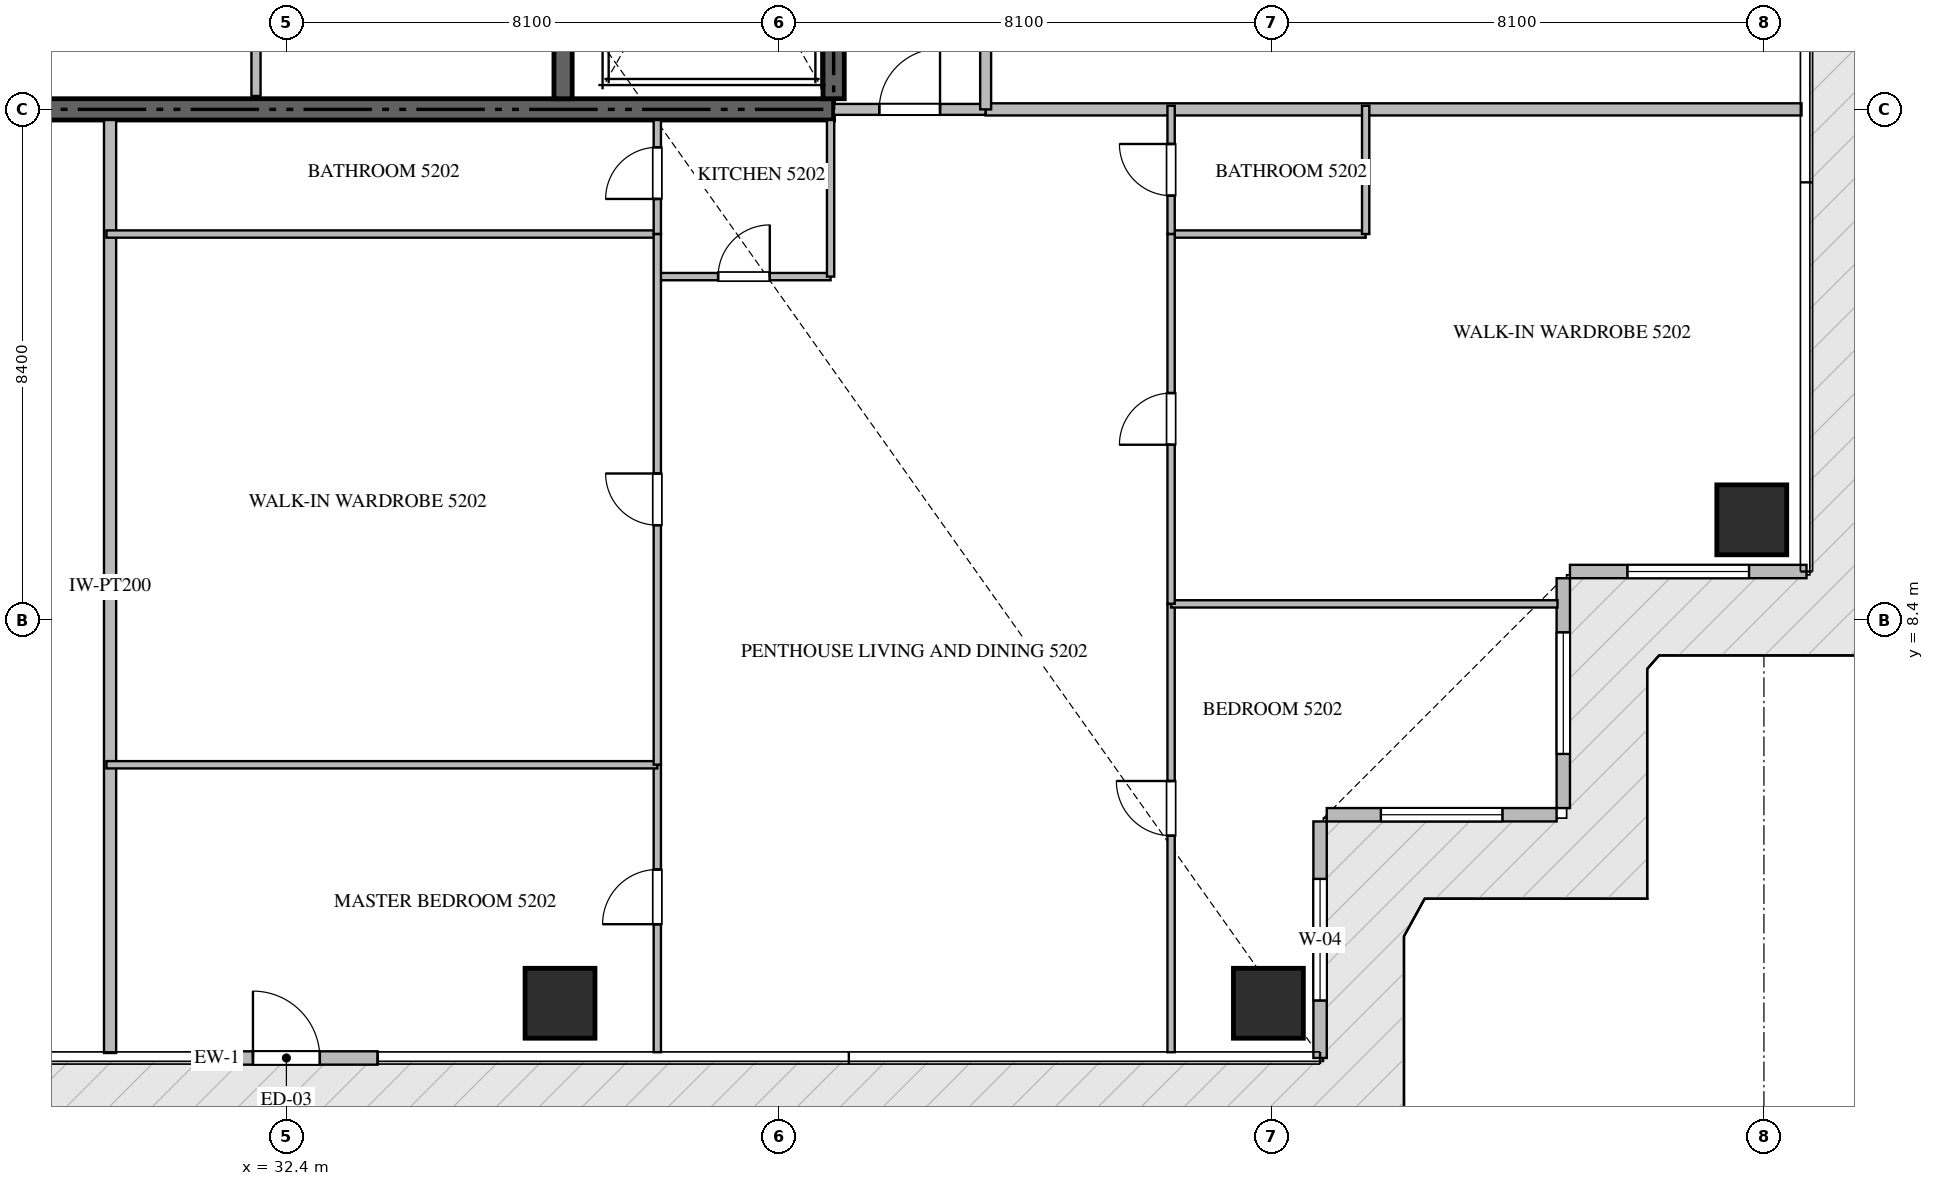
"""IFC4 building model, lengths in metres.
Left out: names, types, materials, properties, quantities, classifications, styles, units other than length and angle.
Written with IfcOpenShell. Run it as: python <this file> out.ifc"""

import sys

from ifc_helpers import new_model, si_unit, direction, frame, frame_2d, origin, origin_2d, place, context, subcontext, project, spatial, rectangle, extrude, source, transform, mapped, element, fill, save


model = new_model("IFC4")
c1 = context("Model", 3, precision=1e-05, world=origin(), true_north=direction((0.0, 1.0)))
c2 = subcontext(c1, "Body", "Model", "MODEL_VIEW")
j1 = project(units=[si_unit("LENGTHUNIT", "METRE"), si_unit("PLANEANGLEUNIT", "RADIAN")], contexts=[c1])
p1 = place(None, origin())
s1 = spatial("IfcSite", under=j1, at=p1, CompositionType="ELEMENT")
p2 = place(p1, origin())
s2 = spatial("IfcBuilding", under=s1, at=p2, CompositionType="ELEMENT")
p3 = place(p2, frame((0.0, 0.0, 210.45)))
s3 = spatial("IfcBuildingStorey", under=s2, at=p3, CompositionType="ELEMENT", Elevation=210.45)
p4 = place(p3, frame((23.4, 16.8, -0.44), z_axis=(0.0, 0.0, 1.0), x_axis=(1.0, 0.0, 0.0)))
e1 = element("IfcWall", 1, at=p4, inside=s3, PredefinedType="SHEAR", context=c2, shape_type="SweptSolid", body=[
    extrude(rectangle(XDim=18.0, YDim=0.35, at=frame_2d((9.0, 0.0))), origin(), (0.0, 0.0, 1.0), 4.028),
])
p5 = place(p3, frame((41.4, 16.975, -0.44), z_axis=(0.0, 0.0, 1.0), x_axis=(0.0, 1.0, 0.0)))
e2 = element("IfcWall", 2, at=p5, inside=s3, PredefinedType="SHEAR", context=c2, shape_type="SweptSolid", body=[
    extrude(rectangle(XDim=8.375, YDim=0.35, at=frame_2d((4.188, 0.0))), origin(), (0.0, 0.0, 1.0), 4.028),
])
p6 = place(p3, frame((36.95, 16.975, -0.44), z_axis=(0.0, 0.0, 1.0), x_axis=(0.0, 1.0, 0.0)))
e3 = element("IfcWall", 3, at=p6, inside=s3, PredefinedType="SHEAR", context=c2, shape_type="SweptSolid", body=[
    extrude(rectangle(XDim=8.375, YDim=0.3, at=frame_2d((4.188, 0.0))), origin(), (0.0, 0.0, 1.0), 4.028),
])
m1 = source(origin(), c2, "Body", "SweptSolid", [
    extrude(rectangle(XDim=1.15, YDim=1.15, at=origin_2d()), origin(), (0.0, 0.0, 1.0), 4.03),
])
for number, where, z_axis, x_axis in (
    (4, (36.9, 2.1, -0.44), (0.0, 0.0, 1.0), (1.0, 0.0, 0.0)),
    (5, (48.55, 2.1, -0.44), (0.0, 0.0, 1.0), (1.0, 0.0, 0.0)),
    (6, (56.5, 10.05, -0.44), (0.0, 0.0, 1.0), (1.0, 0.0, 0.0)),
):
    element("IfcColumn", number, at=place(p3, frame(where, z_axis=z_axis, x_axis=x_axis)), inside=s3, PredefinedType="COLUMN", context=c2, shape_type="MappedRepresentation", body=[
        mapped(m1, transform((0.0, 0.0, 0.0), scale=1.0)),
    ])
p7 = place(p3, frame((30.9, 1.2, 0.0), z_axis=(0.0, 0.0, 1.0), x_axis=(1.0, 0.0, 0.0)))
e7 = element("IfcWall", 7, at=p7, inside=s3, PredefinedType="ELEMENTEDWALL", context=c2, shape_type="SweptSolid", body=[
    extrude(rectangle(XDim=3.0, YDim=0.22, at=frame_2d((1.5, 0.0))), origin(), (0.0, 0.0, 1.0), 3.575),
])
p8 = place(p7, frame((0.95, 0.0, 0.0)))
e8 = element("IfcOpeningElement", 8, at=p8, cuts=e7, PredefinedType="OPENING", context=c2, shape_type="SweptSolid", body=[
    extrude(rectangle(XDim=1.1, YDim=2.2, at=frame_2d((0.55, 1.1))), frame((0.0, 0.12, 0.0), z_axis=(0.0, -1.0, 0.0), x_axis=(1.0, 0.0, 0.0)), (0.0, 0.0, 1.0), 0.24),
])
p9 = place(p3, frame((49.4, 1.2, 0.0), z_axis=(0.0, 0.0, 1.0), x_axis=(0.0, 1.0, 0.0)))
e9 = element("IfcWall", 9, at=p9, inside=s3, PredefinedType="ELEMENTEDWALL", context=c2, shape_type="SweptSolid", body=[
    extrude(rectangle(XDim=3.89, YDim=0.22, at=frame_2d((1.945, 0.0))), origin(), (0.0, 0.0, 1.0), 3.575),
])
p10 = place(p9, frame((0.945, 0.0, 0.65)))
e10 = element("IfcOpeningElement", 10, at=p10, cuts=e9, PredefinedType="OPENING", context=c2, shape_type="SweptSolid", body=[
    extrude(rectangle(XDim=2.0, YDim=2.2, at=frame_2d((1.0, 1.1))), frame((0.0, 0.12, 0.0), z_axis=(0.0, -1.0, 0.0), x_axis=(1.0, 0.0, 0.0)), (0.0, 0.0, 1.0), 0.24),
])
p11 = place(p3, frame((49.51, 5.2, 0.0), z_axis=(0.0, 0.0, 1.0), x_axis=(1.0, 0.0, 0.0)))
e11 = element("IfcWall", 11, at=p11, inside=s3, PredefinedType="ELEMENTEDWALL", context=c2, shape_type="SweptSolid", body=[
    extrude(rectangle(XDim=3.78, YDim=0.22, at=frame_2d((1.89, 0.0))), origin(), (0.0, 0.0, 1.0), 3.575),
])
p12 = place(p11, frame((0.89, 0.0, 0.65)))
e12 = element("IfcOpeningElement", 12, at=p12, cuts=e11, PredefinedType="OPENING", context=c2, shape_type="SweptSolid", body=[
    extrude(rectangle(XDim=2.0, YDim=2.2, at=frame_2d((1.0, 1.1))), frame((0.0, 0.12, 0.0), z_axis=(0.0, -1.0, 0.0), x_axis=(1.0, 0.0, 0.0)), (0.0, 0.0, 1.0), 0.24),
])
p13 = place(p3, frame((53.4, 5.31, 0.0), z_axis=(0.0, 0.0, 1.0), x_axis=(0.0, 1.0, 0.0)))
e13 = element("IfcWall", 13, at=p13, inside=s3, PredefinedType="ELEMENTEDWALL", context=c2, shape_type="SweptSolid", body=[
    extrude(rectangle(XDim=3.78, YDim=0.22, at=frame_2d((1.89, 0.0))), origin(), (0.0, 0.0, 1.0), 3.575),
])
p14 = place(p13, frame((0.89, 0.0, 0.65)))
e14 = element("IfcOpeningElement", 14, at=p14, cuts=e13, PredefinedType="OPENING", context=c2, shape_type="SweptSolid", body=[
    extrude(rectangle(XDim=2.0, YDim=2.2, at=frame_2d((1.0, 1.1))), frame((0.0, 0.12, 0.0), z_axis=(0.0, -1.0, 0.0), x_axis=(1.0, 0.0, 0.0)), (0.0, 0.0, 1.0), 0.24),
])
p15 = place(p3, frame((53.51, 9.2, 0.0), z_axis=(0.0, 0.0, 1.0), x_axis=(1.0, 0.0, 0.0)))
e15 = element("IfcWall", 15, at=p15, inside=s3, PredefinedType="ELEMENTEDWALL", context=c2, shape_type="SweptSolid", body=[
    extrude(rectangle(XDim=3.89, YDim=0.22, at=frame_2d((1.945, 0.0))), origin(), (0.0, 0.0, 1.0), 3.575),
])
p16 = place(p15, frame((0.945, 0.0, 0.65)))
e16 = element("IfcOpeningElement", 16, at=p16, cuts=e15, PredefinedType="OPENING", context=c2, shape_type="SweptSolid", body=[
    extrude(rectangle(XDim=2.0, YDim=2.2, at=frame_2d((1.0, 1.1))), frame((0.0, 0.12, 0.0), z_axis=(0.0, -1.0, 0.0), x_axis=(1.0, 0.0, 0.0)), (0.0, 0.0, 1.0), 0.24),
])
p17 = place(p3, frame((31.9, 17.02, 0.0), z_axis=(0.0, 0.0, 1.0), x_axis=(0.0, 1.0, 0.0)))
e17 = element("IfcWall", 17, at=p17, inside=s3, PredefinedType="PARTITIONING", context=c2, shape_type="SweptSolid", body=[
    extrude(rectangle(XDim=2.73, YDim=0.15, at=frame_2d((1.365, 0.0))), origin(), (0.0, 0.0, 1.0), 3.59),
])
p18 = place(p3, frame((29.5, 1.282, 0.0), z_axis=(0.0, 0.0, 1.0), x_axis=(0.0, 1.0, 0.0)))
e18 = element("IfcWall", 18, at=p18, inside=s3, PredefinedType="PARTITIONING", context=c2, shape_type="SweptSolid", body=[
    extrude(rectangle(XDim=15.343, YDim=0.2, at=frame_2d((7.671, 0.0))), origin(), (0.0, 0.0, 1.0), 3.59),
])
p19 = place(p3, frame((43.9, 16.8, 0.0), z_axis=(0.0, 0.0, 1.0), x_axis=(1.0, 0.0, 0.0)))
e19 = element("IfcWall", 19, at=p19, inside=s3, PredefinedType="PARTITIONING", context=c2, shape_type="SweptSolid", body=[
    extrude(rectangle(XDim=13.418, YDim=0.2, at=frame_2d((6.709, 0.0))), origin(), (0.0, 0.0, 1.0), 3.59),
])
p20 = place(p3, frame((41.402, 16.8, 0.0), z_axis=(0.0, 0.0, 1.0), x_axis=(1.0, 0.0, 0.0)))
e20 = element("IfcWall", 20, at=p20, inside=s3, PredefinedType="PARTITIONING", context=c2, shape_type="SweptSolid", body=[
    extrude(rectangle(XDim=2.496, YDim=0.18, at=frame_2d((1.248, 0.0))), origin(), (0.0, 0.0, 1.0), 3.59),
])
p21 = place(p20, frame((0.748, 0.0, 0.0)))
e21 = element("IfcOpeningElement", 21, at=p21, cuts=e20, PredefinedType="OPENING", context=c2, shape_type="SweptSolid", body=[
    extrude(rectangle(XDim=1.0, YDim=2.15, at=frame_2d((0.5, 1.075))), frame((0.0, 0.1, 0.0), z_axis=(0.0, -1.0, 0.0), x_axis=(1.0, 0.0, 0.0)), (0.0, 0.0, 1.0), 0.2),
])
p22 = place(p3, frame((43.9, 16.8, 0.0), z_axis=(0.0, 0.0, 1.0), x_axis=(0.0, 1.0, 0.0)))
e22 = element("IfcWall", 22, at=p22, inside=s3, PredefinedType="PARTITIONING", context=c2, shape_type="SweptSolid", body=[
    extrude(rectangle(XDim=16.8, YDim=0.18, at=frame_2d((8.4, 0.0))), origin(), (0.0, 0.0, 1.0), 3.59),
])
p23 = place(p22, frame((1.3, 0.0, 0.0)))
e23 = element("IfcOpeningElement", 23, at=p23, cuts=e22, PredefinedType="OPENING", context=c2, shape_type="SweptSolid", body=[
    extrude(rectangle(XDim=1.0, YDim=2.15, at=frame_2d((0.5, 1.075))), frame((0.0, 0.1, 0.0), z_axis=(0.0, -1.0, 0.0), x_axis=(1.0, 0.0, 0.0)), (0.0, 0.0, 1.0), 0.2),
])
p24 = place(p3, frame((38.5, 14.05, 0.0), z_axis=(0.0, 0.0, 1.0), x_axis=(1.0, 0.0, 0.0)))
e24 = element("IfcWall", 24, at=p24, inside=s3, PredefinedType="PARTITIONING", context=c2, shape_type="SweptSolid", body=[
    extrude(rectangle(XDim=2.85, YDim=0.12, at=frame_2d((1.425, 0.0))), origin(), (0.0, 0.0, 1.0), 3.59),
])
p25 = place(p24, frame((1.0, 0.0, 0.0)))
e25 = element("IfcOpeningElement", 25, at=p25, cuts=e24, PredefinedType="OPENING", context=c2, shape_type="SweptSolid", body=[
    extrude(rectangle(XDim=0.85, YDim=2.1, at=frame_2d((0.425, 1.05))), frame((0.0, 0.07, 0.0), z_axis=(0.0, -1.0, 0.0), x_axis=(1.0, 0.0, 0.0)), (0.0, 0.0, 1.0), 0.14),
])
p26 = place(p3, frame((41.35, 14.05, 0.0), z_axis=(0.0, 0.0, 1.0), x_axis=(0.0, 1.0, 0.0)))
e26 = element("IfcWall", 26, at=p26, inside=s3, PredefinedType="PARTITIONING", context=c2, shape_type="SweptSolid", body=[
    extrude(rectangle(XDim=2.575, YDim=0.12, at=frame_2d((1.288, 0.0))), origin(), (0.0, 0.0, 1.0), 3.59),
])
p27 = place(p3, frame((38.5, 1.295, 0.0), z_axis=(0.0, 0.0, 1.0), x_axis=(0.0, 1.0, 0.0)))
e27 = element("IfcWall", 27, at=p27, inside=s3, PredefinedType="PARTITIONING", context=c2, shape_type="SweptSolid", body=[
    extrude(rectangle(XDim=4.727, YDim=0.12, at=frame_2d((2.364, 0.0))), origin(), (0.0, 0.0, 1.0), 3.59),
])
p28 = place(p27, frame((2.105, 0.0, 0.0)))
e28 = element("IfcOpeningElement", 28, at=p28, cuts=e27, PredefinedType="OPENING", context=c2, shape_type="SweptSolid", body=[
    extrude(rectangle(XDim=0.9, YDim=2.1, at=frame_2d((0.45, 1.05))), frame((0.0, 0.07, 0.0), z_axis=(0.0, -1.0, 0.0), x_axis=(1.0, 0.0, 0.0)), (0.0, 0.0, 1.0), 0.14),
])
for number, where, z_axis, x_axis in (
    (29, (29.44, 6.022, 0.0), (0.0, 0.0, 1.0), (1.0, 0.0, 0.0)),
    (30, (29.44, 14.75, 0.0), (0.0, 0.0, 1.0), (1.0, 0.0, 0.0)),
):
    element("IfcWall", number, at=place(p3, frame(where, z_axis=z_axis, x_axis=x_axis)), inside=s3, PredefinedType="PARTITIONING", context=c2, shape_type="SweptSolid", body=[
        extrude(rectangle(XDim=9.06, YDim=0.12, at=frame_2d((4.53, 0.0))), origin(), (0.0, 0.0, 1.0), 3.59),
    ])
p29 = place(p3, frame((38.5, 6.024, 0.0), z_axis=(0.0, 0.0, 1.0), x_axis=(0.0, 1.0, 0.0)))
e31 = element("IfcWall", 31, at=p29, inside=s3, PredefinedType="PARTITIONING", context=c2, shape_type="SweptSolid", body=[
    extrude(rectangle(XDim=8.726, YDim=0.12, at=frame_2d((4.363, 0.0))), origin(), (0.0, 0.0, 1.0), 3.59),
])
p30 = place(p29, frame((3.938, 0.0, 0.0)))
e32 = element("IfcOpeningElement", 32, at=p30, cuts=e31, PredefinedType="OPENING", context=c2, shape_type="SweptSolid", body=[
    extrude(rectangle(XDim=0.85, YDim=2.1, at=frame_2d((0.425, 1.05))), frame((0.0, 0.07, 0.0), z_axis=(0.0, -1.0, 0.0), x_axis=(1.0, 0.0, 0.0)), (0.0, 0.0, 1.0), 0.14),
])
p31 = place(p3, frame((38.5, 14.752, 0.0), z_axis=(0.0, 0.0, 1.0), x_axis=(0.0, 1.0, 0.0)))
e33 = element("IfcWall", 33, at=p31, inside=s3, PredefinedType="PARTITIONING", context=c2, shape_type="SweptSolid", body=[
    extrude(rectangle(XDim=1.873, YDim=0.12, at=frame_2d((0.937, 0.0))), origin(), (0.0, 0.0, 1.0), 3.59),
])
p32 = place(p31, frame((0.575, 0.0, 0.0)))
e34 = element("IfcOpeningElement", 34, at=p32, cuts=e33, PredefinedType="OPENING", context=c2, shape_type="SweptSolid", body=[
    extrude(rectangle(XDim=0.85, YDim=2.1, at=frame_2d((0.425, 1.05))), frame((0.0, 0.07, 0.0), z_axis=(0.0, -1.0, 0.0), x_axis=(1.0, 0.0, 0.0)), (0.0, 0.0, 1.0), 0.14),
])
p33 = place(p3, frame((46.95, 1.295, 0.0), z_axis=(0.0, 0.0, 1.0), x_axis=(0.0, 1.0, 0.0)))
e35 = element("IfcWall", 35, at=p33, inside=s3, PredefinedType="PARTITIONING", context=c2, shape_type="SweptSolid", body=[
    extrude(rectangle(XDim=7.373, YDim=0.12, at=frame_2d((3.687, 0.0))), origin(), (0.0, 0.0, 1.0), 3.59),
])
p34 = place(p33, frame((3.56, 0.0, 0.0)))
e36 = element("IfcOpeningElement", 36, at=p34, cuts=e35, PredefinedType="OPENING", context=c2, shape_type="SweptSolid", body=[
    extrude(rectangle(XDim=0.9, YDim=2.1, at=frame_2d((0.45, 1.05))), frame((0.0, 0.07, 0.0), z_axis=(0.0, -1.0, 0.0), x_axis=(1.0, 0.0, 0.0)), (0.0, 0.0, 1.0), 0.14),
])
p35 = place(p3, frame((46.95, 8.668, 0.0), z_axis=(0.0, 0.0, 1.0), x_axis=(1.0, 0.0, 0.0)))
e37 = element("IfcWall", 37, at=p35, inside=s3, PredefinedType="PARTITIONING", context=c2, shape_type="SweptSolid", body=[
    extrude(rectangle(XDim=6.355, YDim=0.12, at=frame_2d((3.177, 0.0))), origin(), (0.0, 0.0, 1.0), 3.59),
])
p36 = place(p3, frame((46.95, 14.75, 0.0), z_axis=(0.0, 0.0, 1.0), x_axis=(1.0, 0.0, 0.0)))
e38 = element("IfcWall", 38, at=p36, inside=s3, PredefinedType="PARTITIONING", context=c2, shape_type="SweptSolid", body=[
    extrude(rectangle(XDim=3.2, YDim=0.12, at=frame_2d((1.6, 0.0))), origin(), (0.0, 0.0, 1.0), 3.59),
])
p37 = place(p3, frame((50.15, 14.75, 0.0), z_axis=(0.0, 0.0, 1.0), x_axis=(0.0, 1.0, 0.0)))
e39 = element("IfcWall", 39, at=p37, inside=s3, PredefinedType="PARTITIONING", context=c2, shape_type="SweptSolid", body=[
    extrude(rectangle(XDim=2.11, YDim=0.12, at=frame_2d((1.055, 0.0))), origin(), (0.0, 0.0, 1.0), 3.59),
])
p38 = place(p3, frame((46.95, 8.67, 0.0), z_axis=(0.0, 0.0, 1.0), x_axis=(0.0, 1.0, 0.0)))
e40 = element("IfcWall", 40, at=p38, inside=s3, PredefinedType="PARTITIONING", context=c2, shape_type="SweptSolid", body=[
    extrude(rectangle(XDim=6.08, YDim=0.12, at=frame_2d((3.04, 0.0))), origin(), (0.0, 0.0, 1.0), 3.59),
])
p39 = place(p38, frame((2.615, 0.0, 0.0)))
e41 = element("IfcOpeningElement", 41, at=p39, cuts=e40, PredefinedType="OPENING", context=c2, shape_type="SweptSolid", body=[
    extrude(rectangle(XDim=0.85, YDim=2.1, at=frame_2d((0.425, 1.05))), frame((0.0, 0.07, 0.0), z_axis=(0.0, -1.0, 0.0), x_axis=(1.0, 0.0, 0.0)), (0.0, 0.0, 1.0), 0.14),
])
p40 = place(p3, frame((46.95, 14.752, 0.0), z_axis=(0.0, 0.0, 1.0), x_axis=(0.0, 1.0, 0.0)))
e42 = element("IfcWall", 42, at=p40, inside=s3, PredefinedType="PARTITIONING", context=c2, shape_type="SweptSolid", body=[
    extrude(rectangle(XDim=2.108, YDim=0.12, at=frame_2d((1.054, 0.0))), origin(), (0.0, 0.0, 1.0), 3.59),
])
p41 = place(p40, frame((0.629, 0.0, 0.0)))
e43 = element("IfcOpeningElement", 43, at=p41, cuts=e42, PredefinedType="OPENING", context=c2, shape_type="SweptSolid", body=[
    extrude(rectangle(XDim=0.85, YDim=2.1, at=frame_2d((0.425, 1.05))), frame((0.0, 0.07, 0.0), z_axis=(0.0, -1.0, 0.0), x_axis=(1.0, 0.0, 0.0)), (0.0, 0.0, 1.0), 0.14),
])
m2 = source(origin(), c2, "Body", "SweptSolid", [
    extrude(rectangle(XDim=1.1, YDim=2.2, at=frame_2d((0.55, 1.1))), frame((0.0, 0.025, 0.0), z_axis=(0.0, -1.0, 0.0), x_axis=(1.0, 0.0, 0.0)), (0.0, 0.0, 1.0), 0.05),
])
p42 = place(p8, origin())
e44 = element("IfcDoor", 44, at=p42, inside=s3, OperationType="SINGLE_SWING_LEFT", PredefinedType="DOOR", context=c2, shape_type="MappedRepresentation", body=[
    mapped(m2, transform((0.0, 0.0, 0.0), scale=1.0)),
])
fill(e8, e44)
m3 = source(origin(), c2, "Body", "SweptSolid", [
    extrude(rectangle(XDim=2.0, YDim=2.2, at=frame_2d((1.0, 1.1))), frame((0.0, 0.03, 0.0), z_axis=(0.0, -1.0, 0.0), x_axis=(1.0, 0.0, 0.0)), (0.0, 0.0, 1.0), 0.06),
])
p43 = place(p10, origin())
e45 = element("IfcWindow", 45, at=p43, inside=s3, PartitioningType="SINGLE_PANEL", PredefinedType="WINDOW", context=c2, shape_type="MappedRepresentation", body=[
    mapped(m3, transform((0.0, 0.0, 0.0), scale=1.0)),
])
fill(e10, e45)
p44 = place(p12, origin())
e46 = element("IfcWindow", 46, at=p44, inside=s3, PartitioningType="SINGLE_PANEL", PredefinedType="WINDOW", context=c2, shape_type="MappedRepresentation", body=[
    mapped(m3, transform((0.0, 0.0, 0.0), scale=1.0)),
])
fill(e12, e46)
p45 = place(p14, origin())
e47 = element("IfcWindow", 47, at=p45, inside=s3, PartitioningType="SINGLE_PANEL", PredefinedType="WINDOW", context=c2, shape_type="MappedRepresentation", body=[
    mapped(m3, transform((0.0, 0.0, 0.0), scale=1.0)),
])
fill(e14, e47)
p46 = place(p16, origin())
e48 = element("IfcWindow", 48, at=p46, inside=s3, PartitioningType="SINGLE_PANEL", PredefinedType="WINDOW", context=c2, shape_type="MappedRepresentation", body=[
    mapped(m3, transform((0.0, 0.0, 0.0), scale=1.0)),
])
fill(e16, e48)
m4 = source(origin(), c2, "Body", "SweptSolid", [
    extrude(rectangle(XDim=1.0, YDim=2.15, at=frame_2d((0.5, 1.075))), frame((0.0, 0.025, 0.0), z_axis=(0.0, -1.0, 0.0), x_axis=(1.0, 0.0, 0.0)), (0.0, 0.0, 1.0), 0.05),
])
p47 = place(p21, origin())
e49 = element("IfcDoor", 49, at=p47, inside=s3, OperationType="SINGLE_SWING_RIGHT", PredefinedType="DOOR", context=c2, shape_type="MappedRepresentation", body=[
    mapped(m4, transform((0.0, 0.0, 0.0), scale=1.0)),
])
fill(e21, e49)
m5 = source(origin(), c2, "Body", "SweptSolid", [
    extrude(rectangle(XDim=0.85, YDim=2.1, at=frame_2d((0.425, 1.05))), frame((0.0, 0.025, 0.0), z_axis=(0.0, -1.0, 0.0), x_axis=(1.0, 0.0, 0.0)), (0.0, 0.0, 1.0), 0.05),
])
p48 = place(p25, origin())
e50 = element("IfcDoor", 50, at=p48, inside=s3, OperationType="SINGLE_SWING_RIGHT", PredefinedType="DOOR", context=c2, shape_type="MappedRepresentation", body=[
    mapped(m5, transform((0.0, 0.0, 0.0), scale=1.0)),
])
fill(e25, e50)
m6 = source(origin(), c2, "Body", "SweptSolid", [
    extrude(rectangle(XDim=0.9, YDim=2.1, at=frame_2d((0.45, 1.05))), frame((0.0, 0.025, 0.0), z_axis=(0.0, -1.0, 0.0), x_axis=(1.0, 0.0, 0.0)), (0.0, 0.0, 1.0), 0.05),
])
p49 = place(p28, origin())
e51 = element("IfcDoor", 51, at=p49, inside=s3, OperationType="SINGLE_SWING_LEFT", PredefinedType="DOOR", context=c2, shape_type="MappedRepresentation", body=[
    mapped(m6, transform((0.0, 0.0, 0.0), scale=1.0)),
])
fill(e28, e51)
p50 = place(p30, origin())
e52 = element("IfcDoor", 52, at=p50, inside=s3, OperationType="SINGLE_SWING_RIGHT", PredefinedType="DOOR", context=c2, shape_type="MappedRepresentation", body=[
    mapped(m5, transform((0.0, 0.0, 0.0), scale=1.0)),
])
fill(e32, e52)
p51 = place(p32, origin())
e53 = element("IfcDoor", 53, at=p51, inside=s3, OperationType="SINGLE_SWING_LEFT", PredefinedType="DOOR", context=c2, shape_type="MappedRepresentation", body=[
    mapped(m5, transform((0.0, 0.0, 0.0), scale=1.0)),
])
fill(e34, e53)
p52 = place(p34, origin())
e54 = element("IfcDoor", 54, at=p52, inside=s3, OperationType="SINGLE_SWING_RIGHT", PredefinedType="DOOR", context=c2, shape_type="MappedRepresentation", body=[
    mapped(m6, transform((0.0, 0.0, 0.0), scale=1.0)),
])
fill(e36, e54)
p53 = place(p39, origin())
e55 = element("IfcDoor", 55, at=p53, inside=s3, OperationType="SINGLE_SWING_LEFT", PredefinedType="DOOR", context=c2, shape_type="MappedRepresentation", body=[
    mapped(m5, transform((0.0, 0.0, 0.0), scale=1.0)),
])
fill(e41, e55)
p54 = place(p41, origin())
e56 = element("IfcDoor", 56, at=p54, inside=s3, OperationType="SINGLE_SWING_RIGHT", PredefinedType="DOOR", context=c2, shape_type="MappedRepresentation", body=[
    mapped(m5, transform((0.0, 0.0, 0.0), scale=1.0)),
])
fill(e43, e56)
save(model, sys.argv[1])
